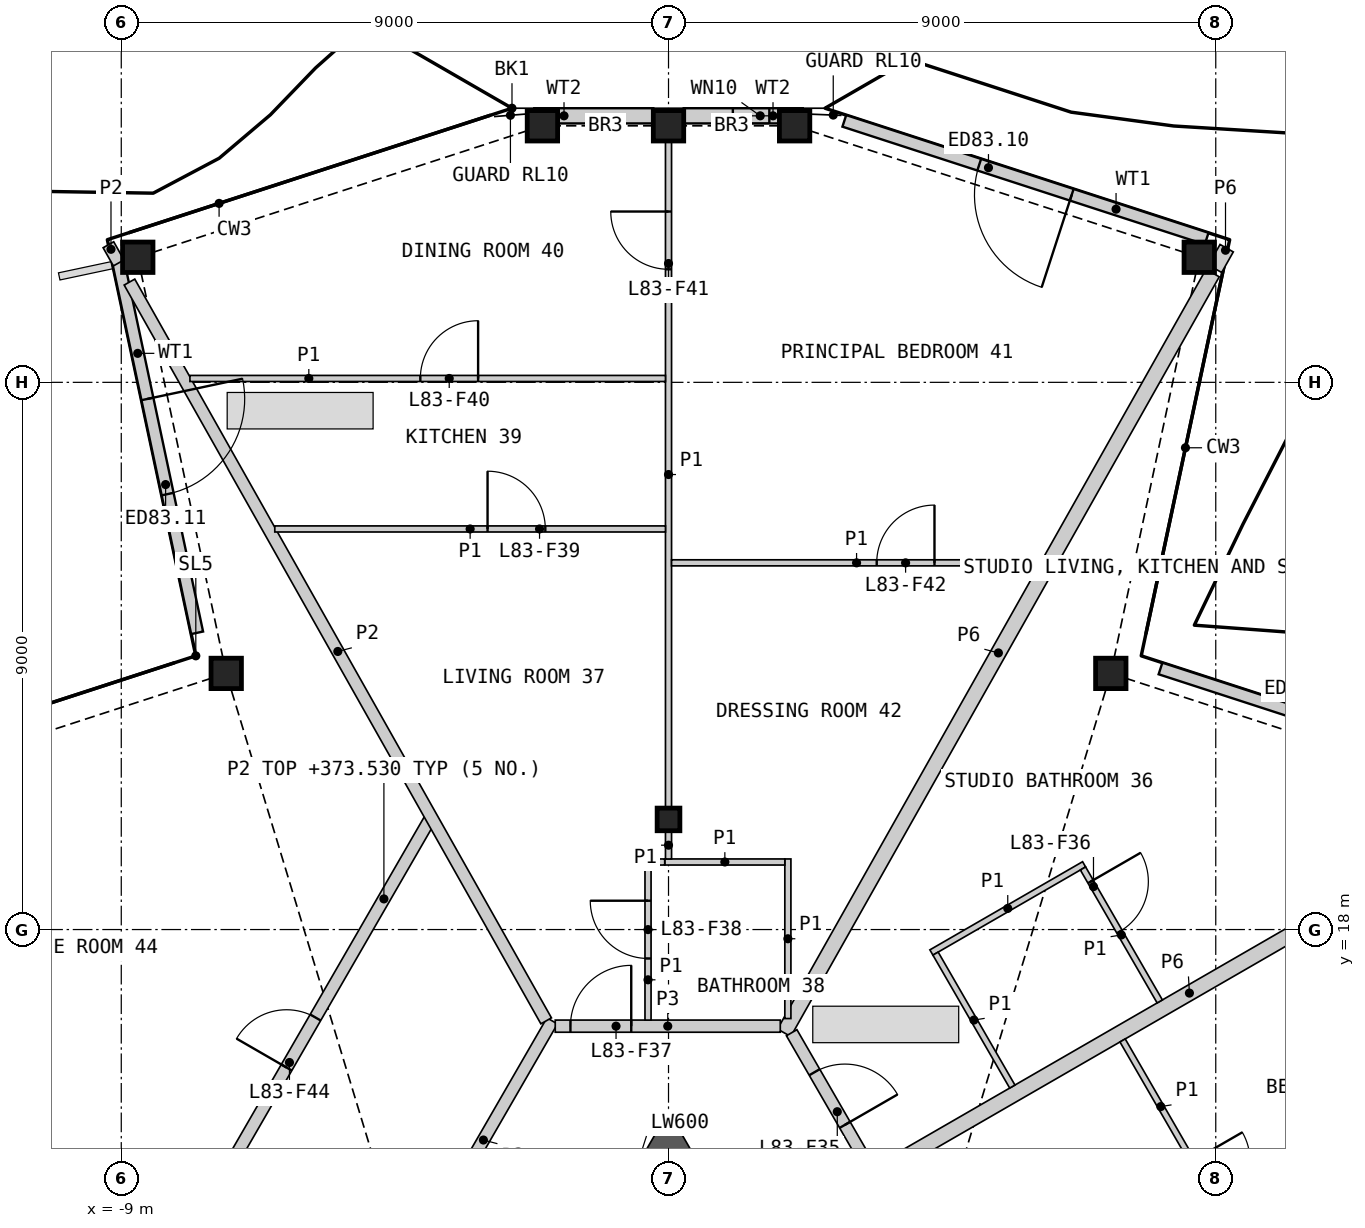
"""IFC4 building model, lengths in metres.
Left out: names, types, materials, properties, quantities, classifications, styles, units other than length and angle.
Written with IfcOpenShell. Run it as: python <this file> out.ifc"""

import sys

from ifc_helpers import new_model, si_unit, direction, frame, frame_2d, origin, origin_2d, place, context, subcontext, project, spatial, polyline, rectangle, hollow_rectangle, i_section, outline, extrude, element, fill, save


model = new_model("IFC4")
c1 = context("Model", 3, precision=1e-05, world=origin(), true_north=direction((0.0, 1.0)))
c2 = subcontext(c1, "Body", "Model", "MODEL_VIEW")
j1 = project(units=[si_unit("LENGTHUNIT", "METRE"), si_unit("PLANEANGLEUNIT", "RADIAN")], contexts=[c1])
p1 = place(None, origin())
s1 = spatial("IfcSite", under=j1, at=p1, CompositionType="ELEMENT")
p2 = place(p1, origin())
s2 = spatial("IfcBuilding", under=s1, at=p2, CompositionType="ELEMENT")
p3 = place(p2, frame((0.0, 0.0, 371.2)))
s3 = spatial("IfcBuildingStorey", under=s2, at=p3, CompositionType="ELEMENT", Elevation=371.2)
for number, where, z_axis, x_axis in (
    (1, (7.274, 22.213, 0.0), (0.0, 0.0, 1.0), (1.0, 0.0, 0.0)),
    (2, (8.729, 29.057, 0.0), (0.0, 0.0, 1.0), (1.0, 0.0, 0.0)),
    (3, (2.074, 31.219, 0.0), (0.0, 0.0, 1.0), (1.0, 0.0, 0.0)),
    (4, (0.0, 31.219, 0.0), (0.0, 0.0, 1.0), (1.0, 0.0, 0.0)),
    (5, (-2.074, 31.219, 0.0), (0.0, 0.0, 1.0), (1.0, 0.0, 0.0)),
    (6, (-8.729, 29.057, 0.0), (0.0, 0.0, 1.0), (1.0, 0.0, 0.0)),
    (7, (-7.274, 22.213, 0.0), (0.0, 0.0, 1.0), (1.0, 0.0, 0.0)),
):
    element("IfcColumn", number, at=place(p3, frame(where, z_axis=z_axis, x_axis=x_axis)), inside=s3, PredefinedType="COLUMN", context=c2, shape_type="SweptSolid", body=[
        extrude(hollow_rectangle(XDim=0.5, YDim=0.5, WallThickness=0.03, at=origin_2d()), origin(), (0.0, 0.0, 1.0), 3.4),
    ])
p4 = place(p3, frame((0.0, 19.811, 0.0), z_axis=(0.0, 0.0, 1.0), x_axis=(1.0, 0.0, 0.0)))
e8 = element("IfcColumn", 8, at=p4, inside=s3, PredefinedType="COLUMN", context=c2, shape_type="SweptSolid", body=[
    extrude(i_section(OverallWidth=0.374, OverallDepth=0.372, WebThickness=0.016, FlangeThickness=0.026, at=origin_2d()), origin(), (0.0, 0.0, 1.0), 3.4),
])
p5 = place(p3, frame((14.05, 20.357, 0.0), z_axis=(0.0, 0.0, 1.0), x_axis=(-0.951060123915, 0.309005891041, 0.0)))
e9 = element("IfcWall", 9, at=p5, inside=s3, PredefinedType="SOLIDWALL", context=c2, shape_type="SweptSolid", body=[
    extrude(rectangle(XDim=6.265, YDim=0.2, at=frame_2d((3.133, 0.0))), origin(), (0.0, 0.0, 1.0), 2.634),
])
p6 = place(p5, frame((2.333, 0.0, 0.0)))
e10 = element("IfcOpeningElement", 10, at=p6, cuts=e9, PredefinedType="OPENING", context=c2, shape_type="SweptSolid", body=[
    extrude(rectangle(XDim=1.6, YDim=2.25, at=frame_2d((0.8, 1.125))), frame((0.0, 0.11, 0.0), z_axis=(0.0, -1.0, 0.0), x_axis=(1.0, 0.0, 0.0)), (0.0, 0.0, 1.0), 0.22),
])
p7 = place(p3, frame((8.85, 29.364, 0.0), z_axis=(0.0, 0.0, 1.0), x_axis=(-0.951048671744, 0.309041136379, 0.0)))
e11 = element("IfcWall", 11, at=p7, inside=s3, PredefinedType="SOLIDWALL", context=c2, shape_type="SweptSolid", body=[
    extrude(rectangle(XDim=6.265, YDim=0.2, at=frame_2d((3.133, 0.0))), origin(), (0.0, 0.0, 1.0), 2.634),
])
p8 = place(p7, frame((2.333, 0.0, 0.0)))
e12 = element("IfcOpeningElement", 12, at=p8, cuts=e11, PredefinedType="OPENING", context=c2, shape_type="SweptSolid", body=[
    extrude(rectangle(XDim=1.6, YDim=2.25, at=frame_2d((0.8, 1.125))), frame((0.0, 0.11, 0.0), z_axis=(0.0, -1.0, 0.0), x_axis=(1.0, 0.0, 0.0)), (0.0, 0.0, 1.0), 0.22),
])
p9 = place(p3, frame((2.208, 31.383, 0.0), z_axis=(0.0, 0.0, 1.0), x_axis=(-1.0, 0.0, 0.0)))
e13 = element("IfcWall", 13, at=p9, inside=s3, PredefinedType="SOLIDWALL", context=c2, shape_type="SweptSolid", body=[
    extrude(rectangle(XDim=1.958, YDim=0.25, at=frame_2d((0.979, 0.0))), origin(), (0.0, 0.0, 1.0), 2.634),
])
p10 = place(p9, frame((0.55, 0.0, 0.4)))
e14 = element("IfcOpeningElement", 14, at=p10, cuts=e13, PredefinedType="OPENING", context=c2, shape_type="SweptSolid", body=[
    extrude(rectangle(XDim=0.6, YDim=0.6, at=frame_2d((0.3, 0.3))), frame((0.0, 0.135, 0.0), z_axis=(0.0, -1.0, 0.0), x_axis=(1.0, 0.0, 0.0)), (0.0, 0.0, 1.0), 0.27),
])
p11 = place(p3, frame((-0.25, 31.383, 0.0), z_axis=(0.0, 0.0, 1.0), x_axis=(-1.0, 0.0, 0.0)))
e15 = element("IfcWall", 15, at=p11, inside=s3, PredefinedType="SOLIDWALL", context=c2, shape_type="SweptSolid", body=[
    extrude(rectangle(XDim=1.958, YDim=0.25, at=frame_2d((0.979, 0.0))), origin(), (0.0, 0.0, 1.0), 2.634),
])
p12 = place(p3, frame((-9.055, 29.009, 0.0), z_axis=(0.0, 0.0, 1.0), x_axis=(0.207926797195, -0.978144389652, 0.0)))
e16 = element("IfcWall", 16, at=p12, inside=s3, PredefinedType="SOLIDWALL", context=c2, shape_type="SweptSolid", body=[
    extrude(rectangle(XDim=6.265, YDim=0.2, at=frame_2d((3.133, 0.0))), origin(), (0.0, 0.0, 1.0), 2.634),
])
p13 = place(p12, frame((2.333, 0.0, 0.0)))
e17 = element("IfcOpeningElement", 17, at=p13, cuts=e16, PredefinedType="OPENING", context=c2, shape_type="SweptSolid", body=[
    extrude(rectangle(XDim=1.6, YDim=2.25, at=frame_2d((0.8, 1.125))), frame((0.0, 0.11, 0.0), z_axis=(0.0, -1.0, 0.0), x_axis=(1.0, 0.0, 0.0)), (0.0, 0.0, 1.0), 0.22),
])
p14 = place(p3, origin())
e18 = element("IfcWall", 18, at=p14, inside=s3, PredefinedType="SHEAR", context=c2, shape_type="SweptSolid", body=[
    extrude(outline(polyline([(-0.52, 14.111), (0.0, 15.011), (0.52, 14.111), (0.0, 13.811), (-0.52, 14.111)])), origin(), (0.0, 0.0, 1.0), 3.1),
])
p15 = place(p3, frame((1.902, 16.302, 0.0), z_axis=(0.0, 0.0, 1.0), x_axis=(0.491233789602, 0.871027763021, 0.0)))
e19 = element("IfcWall", 19, at=p15, inside=s3, PredefinedType="PARTITIONING", context=c2, shape_type="SweptSolid", body=[
    extrude(rectangle(XDim=14.345, YDim=0.25, at=frame_2d((7.173, 0.0))), origin(), (0.0, 0.0, 1.0), 2.33),
])
p16 = place(p3, frame((3.465, 14.01, 0.0), z_axis=(0.0, 0.0, 1.0), x_axis=(0.866032376801, 0.499987922186, 0.0)))
e20 = element("IfcWall", 20, at=p16, inside=s3, PredefinedType="PARTITIONING", context=c2, shape_type="SweptSolid", body=[
    extrude(rectangle(XDim=11.782, YDim=0.25, at=frame_2d((5.891, 0.0))), origin(), (0.0, 0.0, 1.0), 2.33),
])
p17 = place(p3, frame((-4.176, 12.579, 0.0), z_axis=(0.0, 0.0, 1.0), x_axis=(0.499974648164, 0.866040040179, 0.0)))
e21 = element("IfcWall", 21, at=p17, inside=s3, PredefinedType="PARTITIONING", context=c2, shape_type="SweptSolid", body=[
    extrude(rectangle(XDim=4.525, YDim=0.2, at=frame_2d((2.263, 0.0))), origin(), (0.0, 0.0, 1.0), 3.1),
])
p18 = place(p3, frame((2.025, 16.303, 0.0), z_axis=(0.0, 0.0, 1.0), x_axis=(0.500004215162, -0.866022970146, 0.0)))
e22 = element("IfcWall", 22, at=p18, inside=s3, PredefinedType="PARTITIONING", context=c2, shape_type="SweptSolid", body=[
    extrude(rectangle(XDim=4.3, YDim=0.2, at=frame_2d((2.15, 0.0))), origin(), (0.0, 0.0, 1.0), 3.1),
])
p19 = place(p18, frame((0.75, 0.0, 0.0)))
e23 = element("IfcOpeningElement", 23, at=p19, cuts=e22, PredefinedType="OPENING", context=c2, shape_type="SweptSolid", body=[
    extrude(rectangle(XDim=1.0, YDim=2.1, at=frame_2d((0.5, 1.05))), frame((0.0, 0.11, 0.0), z_axis=(0.0, -1.0, 0.0), x_axis=(1.0, 0.0, 0.0)), (0.0, 0.0, 1.0), 0.22),
])
p20 = place(p3, frame((-1.863, 16.411, 0.0), z_axis=(0.0, 0.0, 1.0), x_axis=(1.0, 0.0, 0.0)))
e24 = element("IfcWall", 24, at=p20, inside=s3, PredefinedType="PARTITIONING", context=c2, shape_type="SweptSolid", body=[
    extrude(rectangle(XDim=3.701, YDim=0.2, at=frame_2d((1.851, 0.0))), origin(), (0.0, 0.0, 1.0), 3.1),
])
p21 = place(p20, frame((0.25, 0.0, 0.0)))
e25 = element("IfcOpeningElement", 25, at=p21, cuts=e24, PredefinedType="OPENING", context=c2, shape_type="SweptSolid", body=[
    extrude(rectangle(XDim=1.0, YDim=2.1, at=frame_2d((0.5, 1.05))), frame((0.0, 0.11, 0.0), z_axis=(0.0, -1.0, 0.0), x_axis=(1.0, 0.0, 0.0)), (0.0, 0.0, 1.0), 0.22),
])
p22 = place(p3, frame((8.989, 28.868, 0.0), z_axis=(0.0, 0.0, 1.0), x_axis=(0.491394522511, 0.870937094885, 0.0)))
e26 = element("IfcWall", 26, at=p22, inside=s3, PredefinedType="PARTITIONING", context=c2, shape_type="SweptSolid", body=[
    extrude(rectangle(XDim=0.388, YDim=0.25, at=frame_2d((0.194, 0.0))), origin(), (0.0, 0.0, 1.0), 2.33),
])
p23 = place(p3, frame((-11.473, 6.74, 0.0), z_axis=(0.0, 0.0, 1.0), x_axis=(0.500001082559, 0.866024778768, 0.0)))
e27 = element("IfcWall", 27, at=p23, inside=s3, PredefinedType="PARTITIONING", context=c2, shape_type="SweptSolid", body=[
    extrude(rectangle(XDim=15.094, YDim=0.2, at=frame_2d((7.547, 0.0))), origin(), (0.0, 0.0, 1.0), 2.33),
])
p24 = place(p23, frame((10.383, 0.0, 0.0)))
e28 = element("IfcOpeningElement", 28, at=p24, cuts=e27, PredefinedType="OPENING", context=c2, shape_type="SweptSolid", body=[
    extrude(rectangle(XDim=0.95, YDim=2.1, at=frame_2d((0.475, 1.05))), frame((0.0, 0.11, 0.0), z_axis=(0.0, -1.0, 0.0), x_axis=(1.0, 0.0, 0.0)), (0.0, 0.0, 1.0), 0.22),
])
p25 = place(p3, frame((-8.865, 28.649, 0.0), z_axis=(0.0, 0.0, 1.0), x_axis=(0.491236420263, -0.871026279401, 0.0)))
e29 = element("IfcWall", 29, at=p25, inside=s3, PredefinedType="PARTITIONING", context=c2, shape_type="SweptSolid", body=[
    extrude(rectangle(XDim=13.95, YDim=0.2, at=frame_2d((6.975, 0.0))), origin(), (0.0, 0.0, 1.0), 2.33),
])
p26 = place(p3, frame((-9.211, 29.263, 0.0), z_axis=(0.0, 0.0, 1.0), x_axis=(0.4910719836, -0.871118996994, 0.0)))
e30 = element("IfcWall", 30, at=p26, inside=s3, PredefinedType="PARTITIONING", context=c2, shape_type="SweptSolid", body=[
    extrude(rectangle(XDim=0.343, YDim=0.2, at=frame_2d((0.171, 0.0))), origin(), (0.0, 0.0, 1.0), 2.33),
])
p27 = place(p3, frame((0.0, 20.008, 0.0), z_axis=(0.0, 0.0, 1.0), x_axis=(0.0, 1.0, 0.0)))
e31 = element("IfcWall", 31, at=p27, inside=s3, PredefinedType="PARTITIONING", context=c2, shape_type="SweptSolid", body=[
    extrude(rectangle(XDim=10.951, YDim=0.1, at=frame_2d((5.476, 0.0))), origin(), (0.0, 0.0, 1.0), 2.33),
])
p28 = place(p27, frame((8.851, 0.0, 0.0)))
e32 = element("IfcOpeningElement", 32, at=p28, cuts=e31, PredefinedType="OPENING", context=c2, shape_type="SweptSolid", body=[
    extrude(rectangle(XDim=0.95, YDim=2.1, at=frame_2d((0.475, 1.05))), frame((0.0, 0.06, 0.0), z_axis=(0.0, -1.0, 0.0), x_axis=(1.0, 0.0, 0.0)), (0.0, 0.0, 1.0), 0.12),
])
p29 = place(p3, frame((-7.871, 27.064, 0.0), z_axis=(0.0, 0.0, 1.0), x_axis=(1.0, 0.0, 0.0)))
e33 = element("IfcWall", 33, at=p29, inside=s3, PredefinedType="PARTITIONING", context=c2, shape_type="SweptSolid", body=[
    extrude(rectangle(XDim=7.821, YDim=0.1, at=frame_2d((3.91, 0.0))), origin(), (0.0, 0.0, 1.0), 2.33),
])
p30 = place(p29, frame((3.789, 0.0, 0.0)))
e34 = element("IfcOpeningElement", 34, at=p30, cuts=e33, PredefinedType="OPENING", context=c2, shape_type="SweptSolid", body=[
    extrude(rectangle(XDim=0.95, YDim=2.1, at=frame_2d((0.475, 1.05))), frame((0.0, 0.06, 0.0), z_axis=(0.0, -1.0, 0.0), x_axis=(1.0, 0.0, 0.0)), (0.0, 0.0, 1.0), 0.12),
])
p31 = place(p3, frame((-6.475, 24.589, 0.0), z_axis=(0.0, 0.0, 1.0), x_axis=(1.0, 0.0, 0.0)))
e35 = element("IfcWall", 35, at=p31, inside=s3, PredefinedType="PARTITIONING", context=c2, shape_type="SweptSolid", body=[
    extrude(rectangle(XDim=6.425, YDim=0.1, at=frame_2d((3.212, 0.0))), origin(), (0.0, 0.0, 1.0), 2.33),
])
p32 = place(p31, frame((3.499, 0.0, 0.0)))
e36 = element("IfcOpeningElement", 36, at=p32, cuts=e35, PredefinedType="OPENING", context=c2, shape_type="SweptSolid", body=[
    extrude(rectangle(XDim=0.95, YDim=2.1, at=frame_2d((0.475, 1.05))), frame((0.0, 0.06, 0.0), z_axis=(0.0, -1.0, 0.0), x_axis=(1.0, 0.0, 0.0)), (0.0, 0.0, 1.0), 0.12),
])
p33 = place(p3, frame((0.05, 24.031, 0.0), z_axis=(0.0, 0.0, 1.0), x_axis=(1.0, 0.0, 0.0)))
e37 = element("IfcWall", 37, at=p33, inside=s3, PredefinedType="PARTITIONING", context=c2, shape_type="SweptSolid", body=[
    extrude(rectangle(XDim=6.086, YDim=0.1, at=frame_2d((3.043, 0.0))), origin(), (0.0, 0.0, 1.0), 2.33),
])
p34 = place(p33, frame((3.374, 0.0, 0.0)))
e38 = element("IfcOpeningElement", 38, at=p34, cuts=e37, PredefinedType="OPENING", context=c2, shape_type="SweptSolid", body=[
    extrude(rectangle(XDim=0.95, YDim=2.1, at=frame_2d((0.475, 1.05))), frame((0.0, 0.06, 0.0), z_axis=(0.0, -1.0, 0.0), x_axis=(1.0, 0.0, 0.0)), (0.0, 0.0, 1.0), 0.12),
])
p35 = place(p3, frame((7.468, 16.176, 0.0), z_axis=(0.0, 0.0, 1.0), x_axis=(0.499990214365, -0.86603105345, 0.0)))
e39 = element("IfcWall", 39, at=p35, inside=s3, PredefinedType="PARTITIONING", context=c2, shape_type="SweptSolid", body=[
    extrude(rectangle(XDim=5.025, YDim=0.1, at=frame_2d((2.512, 0.0))), origin(), (0.0, 0.0, 1.0), 2.33),
])
p36 = place(p35, frame((2.293, 0.0, 0.0)))
e40 = element("IfcOpeningElement", 40, at=p36, cuts=e39, PredefinedType="OPENING", context=c2, shape_type="SweptSolid", body=[
    extrude(rectangle(XDim=0.95, YDim=2.1, at=frame_2d((0.475, 1.05))), frame((0.0, 0.06, 0.0), z_axis=(0.0, -1.0, 0.0), x_axis=(1.0, 0.0, 0.0)), (0.0, 0.0, 1.0), 0.12),
])
p37 = place(p3, frame((4.323, 17.623, 0.0), z_axis=(0.0, 0.0, 1.0), x_axis=(0.866032775405, 0.499987231761, 0.0)))
e41 = element("IfcWall", 41, at=p37, inside=s3, PredefinedType="PARTITIONING", context=c2, shape_type="SweptSolid", body=[
    extrude(rectangle(XDim=2.9, YDim=0.1, at=frame_2d((1.45, 0.0))), origin(), (0.0, 0.0, 1.0), 2.33),
])
p38 = place(p3, frame((1.963, 16.536, 0.0), z_axis=(0.0, 0.0, 1.0), x_axis=(0.0, 1.0, 0.0)))
e42 = element("IfcWall", 42, at=p38, inside=s3, PredefinedType="PARTITIONING", context=c2, shape_type="SweptSolid", body=[
    extrude(rectangle(XDim=2.625, YDim=0.1, at=frame_2d((1.312, 0.0))), origin(), (0.0, 0.0, 1.0), 2.33),
])
p39 = place(p3, frame((6.817, 19.004, 0.0), z_axis=(0.0, 0.0, 1.0), x_axis=(0.499976333282, -0.866039067339, 0.0)))
e43 = element("IfcWall", 43, at=p39, inside=s3, PredefinedType="PARTITIONING", context=c2, shape_type="SweptSolid", body=[
    extrude(rectangle(XDim=2.525, YDim=0.1, at=frame_2d((1.262, 0.0))), origin(), (0.0, 0.0, 1.0), 2.33),
])
p40 = place(p39, frame((0.25, 0.0, 0.0)))
e44 = element("IfcOpeningElement", 44, at=p40, cuts=e43, PredefinedType="OPENING", context=c2, shape_type="SweptSolid", body=[
    extrude(rectangle(XDim=0.95, YDim=2.1, at=frame_2d((0.475, 1.05))), frame((0.0, 0.06, 0.0), z_axis=(0.0, -1.0, 0.0), x_axis=(1.0, 0.0, 0.0)), (0.0, 0.0, 1.0), 0.12),
])
p41 = place(p3, frame((4.392, 17.604, 0.0), z_axis=(0.0, 0.0, 1.0), x_axis=(0.500048846702, -0.865997200291, 0.0)))
e45 = element("IfcWall", 45, at=p41, inside=s3, PredefinedType="PARTITIONING", context=c2, shape_type="SweptSolid", body=[
    extrude(rectangle(XDim=2.525, YDim=0.1, at=frame_2d((1.263, 0.0))), origin(), (0.0, 0.0, 1.0), 2.33),
])
p42 = place(p3, frame((-0.337, 16.511, 0.0), z_axis=(0.0, 0.0, 1.0), x_axis=(0.0, 1.0, 0.0)))
e46 = element("IfcWall", 46, at=p42, inside=s3, PredefinedType="PARTITIONING", context=c2, shape_type="SweptSolid", body=[
    extrude(rectangle(XDim=2.649, YDim=0.1, at=frame_2d((1.325, 0.0))), origin(), (0.0, 0.0, 1.0), 2.33),
])
p43 = place(p42, frame((1.013, 0.0, 0.0)))
e47 = element("IfcOpeningElement", 47, at=p43, cuts=e46, PredefinedType="OPENING", context=c2, shape_type="SweptSolid", body=[
    extrude(rectangle(XDim=0.95, YDim=2.1, at=frame_2d((0.475, 1.05))), frame((0.0, 0.06, 0.0), z_axis=(0.0, -1.0, 0.0), x_axis=(1.0, 0.0, 0.0)), (0.0, 0.0, 1.0), 0.12),
])
p44 = place(p3, frame((-0.06, 19.111, 0.0), z_axis=(0.0, 0.0, 1.0), x_axis=(1.0, 0.0, 0.0)))
e48 = element("IfcWall", 48, at=p44, inside=s3, PredefinedType="PARTITIONING", context=c2, shape_type="SweptSolid", body=[
    extrude(rectangle(XDim=1.973, YDim=0.1, at=frame_2d((0.987, 0.0))), origin(), (0.0, 0.0, 1.0), 2.33),
])
p45 = place(p3, frame((0.0, 19.161, 0.0), z_axis=(0.0, 0.0, 1.0), x_axis=(0.0, 1.0, 0.0)))
e49 = element("IfcWall", 49, at=p45, inside=s3, PredefinedType="PARTITIONING", context=c2, shape_type="SweptSolid", body=[
    extrude(rectangle(XDim=0.453, YDim=0.1, at=frame_2d((0.227, 0.0))), origin(), (0.0, 0.0, 1.0), 2.33),
])
p46 = place(p3, frame((-0.287, 19.11, 0.0), z_axis=(0.0, 0.0, 1.0), x_axis=(0.999994683407, 0.003260852229, 0.0)))
e50 = element("IfcWall", 50, at=p46, inside=s3, PredefinedType="PARTITIONING", context=c2, shape_type="SweptSolid", body=[
    extrude(rectangle(XDim=0.225, YDim=0.1, at=frame_2d((0.112, 0.0))), origin(), (0.0, 0.0, 1.0), 2.33),
])
p47 = place(p8, origin())
e51 = element("IfcDoor", 51, at=p47, inside=s3, OperationType="DOUBLE_DOOR_SINGLE_SWING", PredefinedType="DOOR", context=c2, shape_type="SweptSolid", body=[
    extrude(rectangle(XDim=1.6, YDim=2.25, at=frame_2d((0.8, 1.125))), frame((0.0, 0.025, 0.0), z_axis=(0.0, -1.0, 0.0), x_axis=(1.0, 0.0, 0.0)), (0.0, 0.0, 1.0), 0.05),
])
fill(e12, e51)
p48 = place(p10, origin())
e52 = element("IfcWindow", 52, at=p48, inside=s3, PartitioningType="SINGLE_PANEL", PredefinedType="WINDOW", context=c2, shape_type="SweptSolid", body=[
    extrude(rectangle(XDim=0.6, YDim=0.6, at=frame_2d((0.3, 0.3))), frame((0.0, 0.03, 0.0), z_axis=(0.0, -1.0, 0.0), x_axis=(1.0, 0.0, 0.0)), (0.0, 0.0, 1.0), 0.06),
])
fill(e14, e52)
p49 = place(p13, origin())
e53 = element("IfcDoor", 53, at=p49, inside=s3, OperationType="DOUBLE_DOOR_SINGLE_SWING", PredefinedType="DOOR", context=c2, shape_type="SweptSolid", body=[
    extrude(rectangle(XDim=1.6, YDim=2.25, at=frame_2d((0.8, 1.125))), frame((0.0, 0.025, 0.0), z_axis=(0.0, -1.0, 0.0), x_axis=(1.0, 0.0, 0.0)), (0.0, 0.0, 1.0), 0.05),
])
fill(e17, e53)
p50 = place(p19, origin())
e54 = element("IfcDoor", 54, at=p50, inside=s3, OperationType="SINGLE_SWING_RIGHT", PredefinedType="DOOR", context=c2, shape_type="SweptSolid", body=[
    extrude(rectangle(XDim=1.0, YDim=2.1, at=frame_2d((0.5, 1.05))), frame((0.0, 0.025, 0.0), z_axis=(0.0, -1.0, 0.0), x_axis=(1.0, 0.0, 0.0)), (0.0, 0.0, 1.0), 0.05),
])
fill(e23, e54)
p51 = place(p40, origin())
e55 = element("IfcDoor", 55, at=p51, inside=s3, OperationType="SINGLE_SWING_LEFT", PredefinedType="DOOR", context=c2, shape_type="SweptSolid", body=[
    extrude(rectangle(XDim=0.95, YDim=2.1, at=frame_2d((0.475, 1.05))), frame((0.0, 0.025, 0.0), z_axis=(0.0, -1.0, 0.0), x_axis=(1.0, 0.0, 0.0)), (0.0, 0.0, 1.0), 0.05),
])
fill(e44, e55)
p52 = place(p21, origin())
e56 = element("IfcDoor", 56, at=p52, inside=s3, OperationType="SINGLE_SWING_RIGHT", PredefinedType="DOOR", context=c2, shape_type="SweptSolid", body=[
    extrude(rectangle(XDim=1.0, YDim=2.1, at=frame_2d((0.5, 1.05))), frame((0.0, 0.025, 0.0), z_axis=(0.0, -1.0, 0.0), x_axis=(1.0, 0.0, 0.0)), (0.0, 0.0, 1.0), 0.05),
])
fill(e25, e56)
p53 = place(p43, origin())
e57 = element("IfcDoor", 57, at=p53, inside=s3, OperationType="SINGLE_SWING_RIGHT", PredefinedType="DOOR", context=c2, shape_type="SweptSolid", body=[
    extrude(rectangle(XDim=0.95, YDim=2.1, at=frame_2d((0.475, 1.05))), frame((0.0, 0.025, 0.0), z_axis=(0.0, -1.0, 0.0), x_axis=(1.0, 0.0, 0.0)), (0.0, 0.0, 1.0), 0.05),
])
fill(e47, e57)
p54 = place(p32, origin())
e58 = element("IfcDoor", 58, at=p54, inside=s3, OperationType="SINGLE_SWING_LEFT", PredefinedType="DOOR", context=c2, shape_type="SweptSolid", body=[
    extrude(rectangle(XDim=0.95, YDim=2.1, at=frame_2d((0.475, 1.05))), frame((0.0, 0.025, 0.0), z_axis=(0.0, -1.0, 0.0), x_axis=(1.0, 0.0, 0.0)), (0.0, 0.0, 1.0), 0.05),
])
fill(e36, e58)
p55 = place(p30, origin())
e59 = element("IfcDoor", 59, at=p55, inside=s3, OperationType="SINGLE_SWING_RIGHT", PredefinedType="DOOR", context=c2, shape_type="SweptSolid", body=[
    extrude(rectangle(XDim=0.95, YDim=2.1, at=frame_2d((0.475, 1.05))), frame((0.0, 0.025, 0.0), z_axis=(0.0, -1.0, 0.0), x_axis=(1.0, 0.0, 0.0)), (0.0, 0.0, 1.0), 0.05),
])
fill(e34, e59)
p56 = place(p28, origin())
e60 = element("IfcDoor", 60, at=p56, inside=s3, OperationType="SINGLE_SWING_RIGHT", PredefinedType="DOOR", context=c2, shape_type="SweptSolid", body=[
    extrude(rectangle(XDim=0.95, YDim=2.1, at=frame_2d((0.475, 1.05))), frame((0.0, 0.025, 0.0), z_axis=(0.0, -1.0, 0.0), x_axis=(1.0, 0.0, 0.0)), (0.0, 0.0, 1.0), 0.05),
])
fill(e32, e60)
p57 = place(p34, origin())
e61 = element("IfcDoor", 61, at=p57, inside=s3, OperationType="SINGLE_SWING_RIGHT", PredefinedType="DOOR", context=c2, shape_type="SweptSolid", body=[
    extrude(rectangle(XDim=0.95, YDim=2.1, at=frame_2d((0.475, 1.05))), frame((0.0, 0.025, 0.0), z_axis=(0.0, -1.0, 0.0), x_axis=(1.0, 0.0, 0.0)), (0.0, 0.0, 1.0), 0.05),
])
fill(e38, e61)
p58 = place(p24, origin())
e62 = element("IfcDoor", 62, at=p58, inside=s3, OperationType="SINGLE_SWING_LEFT", PredefinedType="DOOR", context=c2, shape_type="SweptSolid", body=[
    extrude(rectangle(XDim=0.95, YDim=2.1, at=frame_2d((0.475, 1.05))), frame((0.0, 0.025, 0.0), z_axis=(0.0, -1.0, 0.0), x_axis=(1.0, 0.0, 0.0)), (0.0, 0.0, 1.0), 0.05),
])
fill(e28, e62)
save(model, sys.argv[1])
